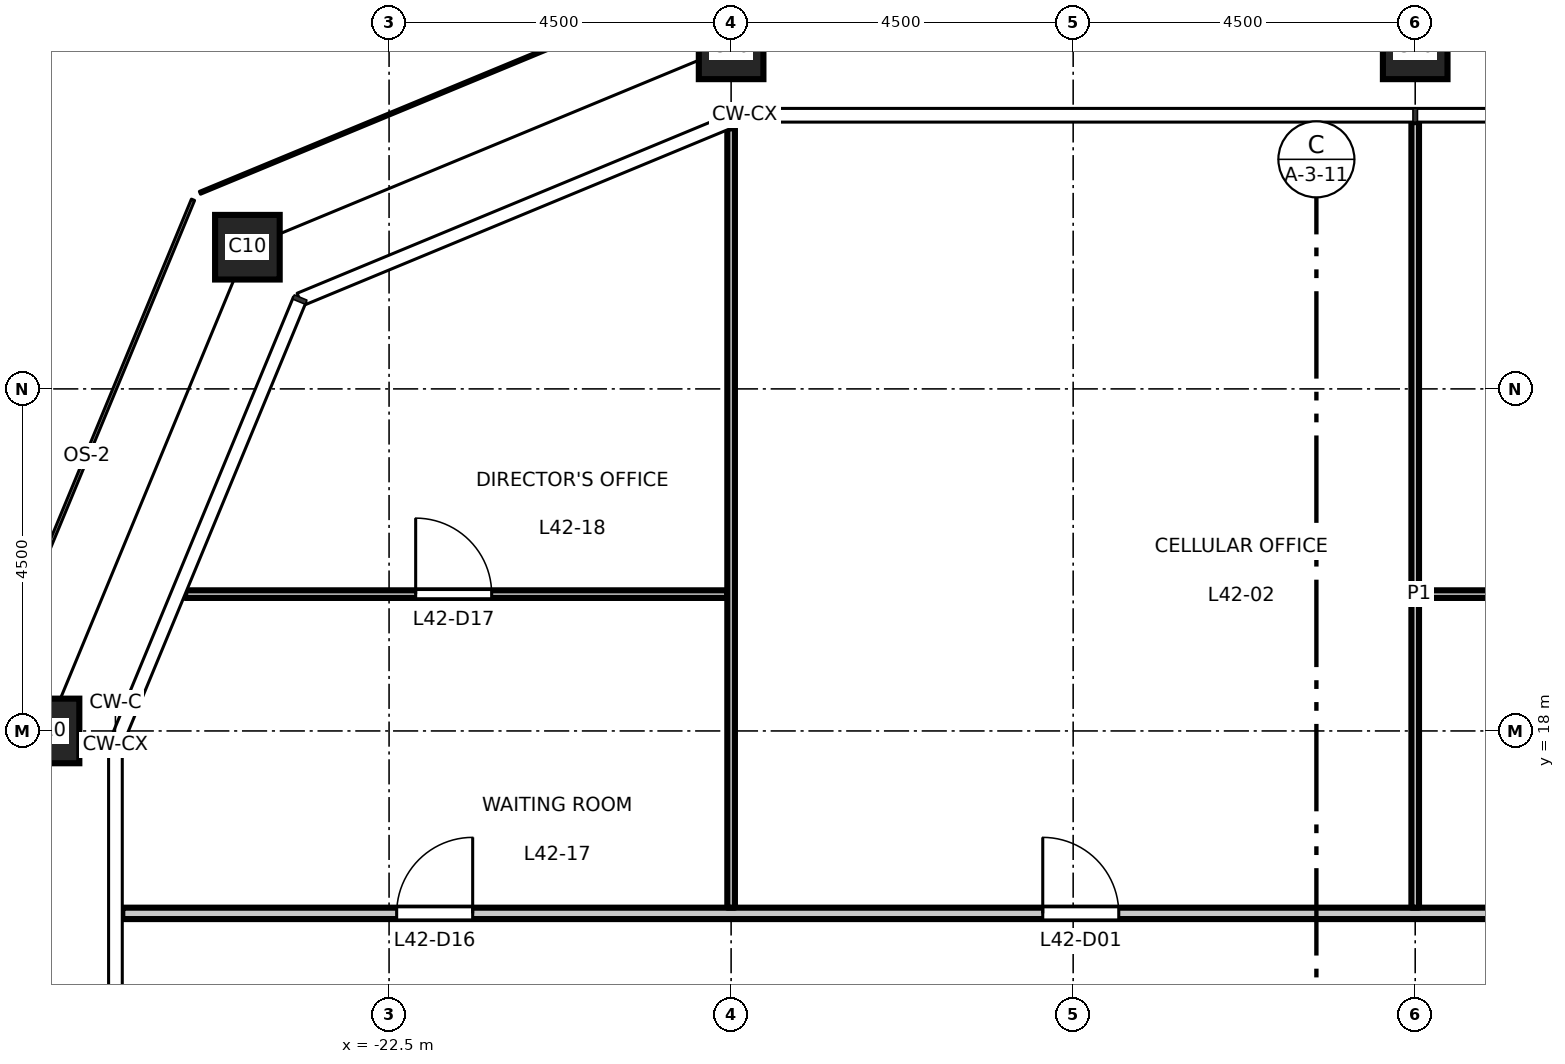
"""IFC4 building model, lengths in metres.
Left out: names, types, materials, properties, quantities, classifications, styles, units other than length and angle.
Written with IfcOpenShell. Run it as: python <this file> out.ifc"""

import sys

from ifc_helpers import new_model, si_unit, direction, frame, frame_2d, origin, origin_2d, place, context, subcontext, project, spatial, rectangle, hollow_rectangle, extrude, element, fill, save


model = new_model("IFC4")
c1 = context("Model", 3, precision=1e-05, world=origin(), true_north=direction((0.0, 1.0)))
c2 = subcontext(c1, "Body", "Model", "MODEL_VIEW")
j1 = project(units=[si_unit("LENGTHUNIT", "METRE"), si_unit("PLANEANGLEUNIT", "RADIAN")], contexts=[c1])
p1 = place(None, origin())
s1 = spatial("IfcSite", under=j1, at=p1, CompositionType="ELEMENT")
p2 = place(p1, origin())
s2 = spatial("IfcBuilding", under=s1, at=p2, CompositionType="ELEMENT")
p3 = place(p2, frame((0.0, 0.0, 197.2)))
s3 = spatial("IfcBuildingStorey", under=s2, at=p3, CompositionType="ELEMENT", Elevation=197.2)
for number, where, z_axis, x_axis in (
    (1, (-9.0, 27.0, 0.0), (0.0, 0.0, 1.0), (1.0, 0.0, 0.0)),
    (2, (-18.0, 27.0, 0.0), (0.0, 0.0, 1.0), (1.0, 0.0, 0.0)),
    (3, (-24.364, 24.364, 0.0), (0.0, 0.0, 1.0), (1.0, 0.0, 0.0)),
    (4, (-27.0, 18.0, 0.0), (0.0, 0.0, 1.0), (1.0, 0.0, 0.0)),
):
    element("IfcColumn", number, at=place(p3, frame(where, z_axis=z_axis, x_axis=x_axis)), inside=s3, PredefinedType="COLUMN", context=c2, shape_type="SweptSolid", body=[
        extrude(hollow_rectangle(XDim=0.85, YDim=0.85, WallThickness=0.05, at=origin_2d()), origin(), (0.0, 0.0, 1.0), 4.5),
    ])
p4 = place(p3, frame((-26.01, 15.6, 0.0), z_axis=(0.0, 0.0, 1.0), x_axis=(1.0, 0.0, 0.0)))
e5 = element("IfcWall", 5, at=p4, inside=s3, PredefinedType="PARTITIONING", context=c2, shape_type="SweptSolid", body=[
    extrude(rectangle(XDim=52.02, YDim=0.15, at=frame_2d((26.01, 0.0))), origin(), (0.0, 0.0, 1.0), 4.35),
])
p5 = place(p4, frame((12.11, 0.0, 0.0)))
e6 = element("IfcOpeningElement", 6, at=p5, cuts=e5, PredefinedType="OPENING", context=c2, shape_type="SweptSolid", body=[
    extrude(rectangle(XDim=1.0, YDim=2.1, at=frame_2d((0.5, 1.05))), frame((0.0, 0.085, 0.0), z_axis=(0.0, -1.0, 0.0), x_axis=(1.0, 0.0, 0.0)), (0.0, 0.0, 1.0), 0.17),
])
p6 = place(p4, frame((21.11, 0.0, 0.0)))
e7 = element("IfcOpeningElement", 7, at=p6, cuts=e5, PredefinedType="OPENING", context=c2, shape_type="SweptSolid", body=[
    extrude(rectangle(XDim=1.0, YDim=2.1, at=frame_2d((0.5, 1.05))), frame((0.0, 0.085, 0.0), z_axis=(0.0, -1.0, 0.0), x_axis=(1.0, 0.0, 0.0)), (0.0, 0.0, 1.0), 0.17),
])
p7 = place(p4, frame((27.86, 0.0, 0.0)))
e8 = element("IfcOpeningElement", 8, at=p7, cuts=e5, PredefinedType="OPENING", context=c2, shape_type="SweptSolid", body=[
    extrude(rectangle(XDim=1.0, YDim=2.1, at=frame_2d((0.5, 1.05))), frame((0.0, 0.085, 0.0), z_axis=(0.0, -1.0, 0.0), x_axis=(1.0, 0.0, 0.0)), (0.0, 0.0, 1.0), 0.17),
])
p8 = place(p4, frame((32.36, 0.0, 0.0)))
e9 = element("IfcOpeningElement", 9, at=p8, cuts=e5, PredefinedType="OPENING", context=c2, shape_type="SweptSolid", body=[
    extrude(rectangle(XDim=1.0, YDim=2.1, at=frame_2d((0.5, 1.05))), frame((0.0, 0.085, 0.0), z_axis=(0.0, -1.0, 0.0), x_axis=(1.0, 0.0, 0.0)), (0.0, 0.0, 1.0), 0.17),
])
p9 = place(p4, frame((39.11, 0.0, 0.0)))
e10 = element("IfcOpeningElement", 10, at=p9, cuts=e5, PredefinedType="OPENING", context=c2, shape_type="SweptSolid", body=[
    extrude(rectangle(XDim=1.0, YDim=2.1, at=frame_2d((0.5, 1.05))), frame((0.0, 0.085, 0.0), z_axis=(0.0, -1.0, 0.0), x_axis=(1.0, 0.0, 0.0)), (0.0, 0.0, 1.0), 0.17),
])
p10 = place(p4, frame((3.61, 0.0, 0.0)))
e11 = element("IfcOpeningElement", 11, at=p10, cuts=e5, PredefinedType="OPENING", context=c2, shape_type="SweptSolid", body=[
    extrude(rectangle(XDim=1.0, YDim=2.1, at=frame_2d((0.5, 1.05))), frame((0.0, 0.085, 0.0), z_axis=(0.0, -1.0, 0.0), x_axis=(1.0, 0.0, 0.0)), (0.0, 0.0, 1.0), 0.17),
])
p11 = place(p4, frame((47.62, 0.0, 0.0)))
e12 = element("IfcOpeningElement", 12, at=p11, cuts=e5, PredefinedType="OPENING", context=c2, shape_type="SweptSolid", body=[
    extrude(rectangle(XDim=1.0, YDim=2.1, at=frame_2d((0.5, 1.05))), frame((0.0, 0.085, 0.0), z_axis=(0.0, -1.0, 0.0), x_axis=(1.0, 0.0, 0.0)), (0.0, 0.0, 1.0), 0.17),
])
p12 = place(p3, frame((-25.183, 19.8, 0.0), z_axis=(0.0, 0.0, 1.0), x_axis=(1.0, 0.0, 0.0)))
e13 = element("IfcWall", 13, at=p12, inside=s3, PredefinedType="PARTITIONING", context=c2, shape_type="SweptSolid", body=[
    extrude(rectangle(XDim=7.133, YDim=0.1, at=frame_2d((3.566, 0.0))), origin(), (0.0, 0.0, 1.0), 4.35),
])
p13 = place(p12, frame((3.033, 0.0, 0.0)))
e14 = element("IfcOpeningElement", 14, at=p13, cuts=e13, PredefinedType="OPENING", context=c2, shape_type="SweptSolid", body=[
    extrude(rectangle(XDim=1.0, YDim=2.1, at=frame_2d((0.5, 1.05))), frame((0.0, 0.06, 0.0), z_axis=(0.0, -1.0, 0.0), x_axis=(1.0, 0.0, 0.0)), (0.0, 0.0, 1.0), 0.12),
])
p14 = place(p3, frame((-8.95, 19.8, 0.0), z_axis=(0.0, 0.0, 1.0), x_axis=(1.0, 0.0, 0.0)))
e15 = element("IfcWall", 15, at=p14, inside=s3, PredefinedType="PARTITIONING", context=c2, shape_type="SweptSolid", body=[
    extrude(rectangle(XDim=34.133, YDim=0.1, at=frame_2d((17.066, 0.0))), origin(), (0.0, 0.0, 1.0), 4.35),
])
p15 = place(p14, frame((4.05, 0.0, 0.0)))
e16 = element("IfcOpeningElement", 16, at=p15, cuts=e15, PredefinedType="OPENING", context=c2, shape_type="SweptSolid", body=[
    extrude(rectangle(XDim=1.0, YDim=2.1, at=frame_2d((0.5, 1.05))), frame((0.0, 0.06, 0.0), z_axis=(0.0, -1.0, 0.0), x_axis=(1.0, 0.0, 0.0)), (0.0, 0.0, 1.0), 0.12),
])
p16 = place(p14, frame((10.8, 0.0, 0.0)))
e17 = element("IfcOpeningElement", 17, at=p16, cuts=e15, PredefinedType="OPENING", context=c2, shape_type="SweptSolid", body=[
    extrude(rectangle(XDim=1.0, YDim=2.1, at=frame_2d((0.5, 1.05))), frame((0.0, 0.06, 0.0), z_axis=(0.0, -1.0, 0.0), x_axis=(1.0, 0.0, 0.0)), (0.0, 0.0, 1.0), 0.12),
])
p17 = place(p14, frame((22.05, 0.0, 0.0)))
e18 = element("IfcOpeningElement", 18, at=p17, cuts=e15, PredefinedType="OPENING", context=c2, shape_type="SweptSolid", body=[
    extrude(rectangle(XDim=1.0, YDim=2.1, at=frame_2d((0.5, 1.05))), frame((0.0, 0.06, 0.0), z_axis=(0.0, -1.0, 0.0), x_axis=(1.0, 0.0, 0.0)), (0.0, 0.0, 1.0), 0.12),
])
p18 = place(p14, frame((29.983, 0.0, 0.0)))
e19 = element("IfcOpeningElement", 19, at=p18, cuts=e15, PredefinedType="OPENING", context=c2, shape_type="SweptSolid", body=[
    extrude(rectangle(XDim=1.0, YDim=2.1, at=frame_2d((0.5, 1.05))), frame((0.0, 0.06, 0.0), z_axis=(0.0, -1.0, 0.0), x_axis=(1.0, 0.0, 0.0)), (0.0, 0.0, 1.0), 0.12),
])
p19 = place(p3, frame((-18.0, 15.675, 0.0), z_axis=(0.0, 0.0, 1.0), x_axis=(0.0, 1.0, 0.0)))
e20 = element("IfcWall", 20, at=p19, inside=s3, PredefinedType="PARTITIONING", context=c2, shape_type="SweptSolid", body=[
    extrude(rectangle(XDim=10.253, YDim=0.1, at=frame_2d((5.126, 0.0))), origin(), (0.0, 0.0, 1.0), 3.65),
])
p20 = place(p3, frame((-9.0, 15.675, 0.0), z_axis=(0.0, 0.0, 1.0), x_axis=(0.0, 1.0, 0.0)))
e21 = element("IfcWall", 21, at=p20, inside=s3, PredefinedType="PARTITIONING", context=c2, shape_type="SweptSolid", body=[
    extrude(rectangle(XDim=10.335, YDim=0.1, at=frame_2d((5.167, 0.0))), origin(), (0.0, 0.0, 1.0), 3.65),
])
p21 = place(p5, origin())
e22 = element("IfcDoor", 22, at=p21, inside=s3, OperationType="SINGLE_SWING_LEFT", PredefinedType="DOOR", context=c2, shape_type="SweptSolid", body=[
    extrude(rectangle(XDim=1.0, YDim=2.1, at=frame_2d((0.5, 1.05))), frame((0.0, 0.025, 0.0), z_axis=(0.0, -1.0, 0.0), x_axis=(1.0, 0.0, 0.0)), (0.0, 0.0, 1.0), 0.05),
])
fill(e6, e22)
p22 = place(p10, origin())
e23 = element("IfcDoor", 23, at=p22, inside=s3, OperationType="SINGLE_SWING_RIGHT", PredefinedType="DOOR", context=c2, shape_type="SweptSolid", body=[
    extrude(rectangle(XDim=1.0, YDim=2.1, at=frame_2d((0.5, 1.05))), frame((0.0, 0.025, 0.0), z_axis=(0.0, -1.0, 0.0), x_axis=(1.0, 0.0, 0.0)), (0.0, 0.0, 1.0), 0.05),
])
fill(e11, e23)
p23 = place(p13, origin())
e24 = element("IfcDoor", 24, at=p23, inside=s3, OperationType="SINGLE_SWING_LEFT", PredefinedType="DOOR", context=c2, shape_type="SweptSolid", body=[
    extrude(rectangle(XDim=1.0, YDim=2.1, at=frame_2d((0.5, 1.05))), frame((0.0, 0.025, 0.0), z_axis=(0.0, -1.0, 0.0), x_axis=(1.0, 0.0, 0.0)), (0.0, 0.0, 1.0), 0.05),
])
fill(e14, e24)
save(model, sys.argv[1])
